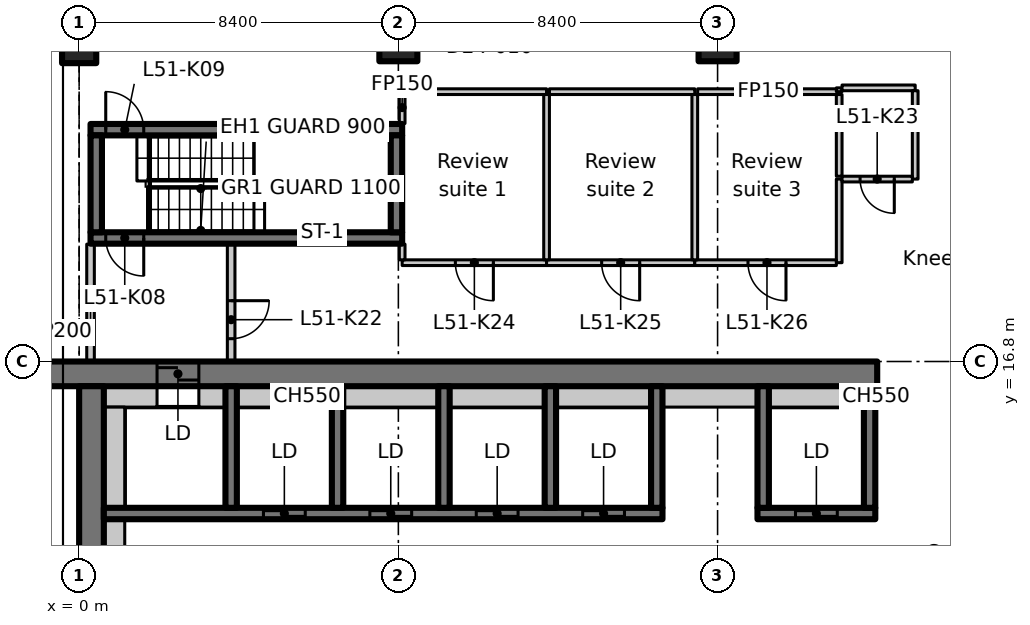
"""IFC4 building model, lengths in metres.
Left out: names, types, materials, properties, quantities, classifications, styles, units other than length and angle.
Written with IfcOpenShell. Run it as: python <this file> out.ifc"""

import sys

from ifc_helpers import new_model, si_unit, direction, frame, frame_2d, origin, origin_2d, place, context, subcontext, project, spatial, rectangle, extrude, element, fill, save


model = new_model("IFC4")
c1 = context("Model", 3, precision=1e-05, world=origin(), true_north=direction((0.0, 1.0)))
c2 = subcontext(c1, "Body", "Model", "MODEL_VIEW")
j1 = project(units=[si_unit("LENGTHUNIT", "METRE"), si_unit("PLANEANGLEUNIT", "RADIAN")], contexts=[c1])
p1 = place(None, origin())
s1 = spatial("IfcSite", under=j1, at=p1, CompositionType="ELEMENT")
p2 = place(p1, origin())
s2 = spatial("IfcBuilding", under=s1, at=p2, CompositionType="ELEMENT")
p3 = place(p2, frame((0.0, 0.0, 202.8)))
s3 = spatial("IfcBuildingStorey", under=s2, at=p3, CompositionType="ELEMENT", Elevation=202.8)
p4 = place(p3, frame((0.0, 25.2, 0.0), z_axis=(0.0, 0.0, 1.0), x_axis=(1.0, 0.0, 0.0)))
e1 = element("IfcColumn", 1, at=p4, inside=s3, PredefinedType="COLUMN", context=c2, shape_type="SweptSolid", body=[
    extrude(rectangle(XDim=0.9, YDim=1.1, at=origin_2d()), origin(), (0.0, 0.0, 1.0), 3.3),
])
for number, where, z_axis, x_axis in (
    (2, (8.4, 25.2, 0.0), (0.0, 0.0, 1.0), (1.0, 0.0, 0.0)),
    (3, (16.8, 25.2, 0.0), (0.0, 0.0, 1.0), (1.0, 0.0, 0.0)),
):
    element("IfcColumn", number, at=place(p3, frame(where, z_axis=z_axis, x_axis=x_axis)), inside=s3, PredefinedType="COLUMN", context=c2, shape_type="SweptSolid", body=[
        extrude(rectangle(XDim=1.0, YDim=1.0, at=origin_2d()), origin(), (0.0, 0.0, 1.0), 3.3),
    ])
p5 = place(p3, frame((-1.1, 16.475, 0.0), z_axis=(0.0, 0.0, 1.0), x_axis=(1.0, 0.0, 0.0)))
e4 = element("IfcWall", 4, at=p5, inside=s3, PredefinedType="SHEAR", context=c2, shape_type="SweptSolid", body=[
    extrude(rectangle(XDim=22.1, YDim=0.65, at=frame_2d((11.05, 0.0))), origin(), (0.0, 0.0, 1.0), 3.3),
])
p6 = place(p5, frame((3.15, 0.0, 0.0)))
e5 = element("IfcOpeningElement", 5, at=p6, cuts=e4, PredefinedType="OPENING", context=c2, shape_type="SweptSolid", body=[
    extrude(rectangle(XDim=1.1, YDim=2.3, at=frame_2d((0.55, 1.15))), frame((0.0, 0.335, 0.0), z_axis=(0.0, -1.0, 0.0), x_axis=(1.0, 0.0, 0.0)), (0.0, 0.0, 1.0), 0.67),
])
p7 = place(p3, frame((0.325, 7.286, 0.0), z_axis=(0.0, 0.0, 1.0), x_axis=(0.0, 1.0, 0.0)))
e6 = element("IfcWall", 6, at=p7, inside=s3, PredefinedType="SHEAR", context=c2, shape_type="SweptSolid", body=[
    extrude(rectangle(XDim=8.864, YDim=0.65, at=frame_2d((4.432, 0.0))), origin(), (0.0, 0.0, 1.0), 3.3),
])
p8 = place(p3, frame((0.65, 15.875, 0.0), z_axis=(0.0, 0.0, 1.0), x_axis=(1.0, 0.0, 0.0)))
e7 = element("IfcWall", 7, at=p8, inside=s3, PredefinedType="PARTITIONING", context=c2, shape_type="SweptSolid", body=[
    extrude(rectangle(XDim=1.4, YDim=0.55, at=frame_2d((0.7, 0.0))), origin(), (0.0, 0.0, 1.0), 3.3),
])
p9 = place(p3, frame((0.65, 12.8, 0.0), z_axis=(0.0, 0.0, 1.0), x_axis=(1.0, 0.0, 0.0)))
e8 = element("IfcWall", 8, at=p9, inside=s3, PredefinedType="SHEAR", context=c2, shape_type="SweptSolid", body=[
    extrude(rectangle(XDim=14.7, YDim=0.3, at=frame_2d((7.35, 0.0))), origin(), (0.0, 0.0, 1.0), 3.3),
])
p10 = place(p9, frame((4.2, 0.0, 0.0)))
e9 = element("IfcOpeningElement", 9, at=p10, cuts=e8, PredefinedType="OPENING", context=c2, shape_type="SweptSolid", body=[
    extrude(rectangle(XDim=1.1, YDim=2.3, at=frame_2d((0.55, 1.15))), frame((0.0, 0.16, 0.0), z_axis=(0.0, -1.0, 0.0), x_axis=(1.0, 0.0, 0.0)), (0.0, 0.0, 1.0), 0.32),
])
p11 = place(p9, frame((7.0, 0.0, 0.0)))
e10 = element("IfcOpeningElement", 10, at=p11, cuts=e8, PredefinedType="OPENING", context=c2, shape_type="SweptSolid", body=[
    extrude(rectangle(XDim=1.1, YDim=2.3, at=frame_2d((0.55, 1.15))), frame((0.0, 0.16, 0.0), z_axis=(0.0, -1.0, 0.0), x_axis=(1.0, 0.0, 0.0)), (0.0, 0.0, 1.0), 0.32),
])
p12 = place(p9, frame((9.8, 0.0, 0.0)))
e11 = element("IfcOpeningElement", 11, at=p12, cuts=e8, PredefinedType="OPENING", context=c2, shape_type="SweptSolid", body=[
    extrude(rectangle(XDim=1.1, YDim=2.3, at=frame_2d((0.55, 1.15))), frame((0.0, 0.16, 0.0), z_axis=(0.0, -1.0, 0.0), x_axis=(1.0, 0.0, 0.0)), (0.0, 0.0, 1.0), 0.32),
])
p13 = place(p9, frame((12.6, 0.0, 0.0)))
e12 = element("IfcOpeningElement", 12, at=p13, cuts=e8, PredefinedType="OPENING", context=c2, shape_type="SweptSolid", body=[
    extrude(rectangle(XDim=1.1, YDim=2.3, at=frame_2d((0.55, 1.15))), frame((0.0, 0.16, 0.0), z_axis=(0.0, -1.0, 0.0), x_axis=(1.0, 0.0, 0.0)), (0.0, 0.0, 1.0), 0.32),
])
for number, where, z_axis, x_axis in (
    (13, (4.0, 12.95, 0.0), (0.0, 0.0, 1.0), (0.0, 1.0, 0.0)),
    (14, (6.8, 12.95, 0.0), (0.0, 0.0, 1.0), (0.0, 1.0, 0.0)),
    (15, (9.6, 12.95, 0.0), (0.0, 0.0, 1.0), (0.0, 1.0, 0.0)),
    (16, (12.4, 12.95, 0.0), (0.0, 0.0, 1.0), (0.0, 1.0, 0.0)),
    (17, (15.2, 12.95, 0.0), (0.0, 0.0, 1.0), (0.0, 1.0, 0.0)),
):
    element("IfcWall", number, at=place(p3, frame(where, z_axis=z_axis, x_axis=x_axis)), inside=s3, PredefinedType="SHEAR", context=c2, shape_type="SweptSolid", body=[
        extrude(rectangle(XDim=3.2, YDim=0.3, at=frame_2d((1.6, 0.0))), origin(), (0.0, 0.0, 1.0), 3.3),
    ])
p14 = place(p3, frame((17.85, 12.8, 0.0), z_axis=(0.0, 0.0, 1.0), x_axis=(1.0, 0.0, 0.0)))
e18 = element("IfcWall", 18, at=p14, inside=s3, PredefinedType="SHEAR", context=c2, shape_type="SweptSolid", body=[
    extrude(rectangle(XDim=3.1, YDim=0.3, at=frame_2d((1.55, 0.0))), origin(), (0.0, 0.0, 1.0), 3.3),
])
p15 = place(p14, frame((1.0, 0.0, 0.0)))
e19 = element("IfcOpeningElement", 19, at=p15, cuts=e18, PredefinedType="OPENING", context=c2, shape_type="SweptSolid", body=[
    extrude(rectangle(XDim=1.1, YDim=2.3, at=frame_2d((0.55, 1.15))), frame((0.0, 0.16, 0.0), z_axis=(0.0, -1.0, 0.0), x_axis=(1.0, 0.0, 0.0)), (0.0, 0.0, 1.0), 0.32),
])
for number, where, z_axis, x_axis in (
    (20, (18.0, 12.95, 0.0), (0.0, 0.0, 1.0), (0.0, 1.0, 0.0)),
    (21, (20.8, 12.95, 0.0), (0.0, 0.0, 1.0), (0.0, 1.0, 0.0)),
):
    element("IfcWall", number, at=place(p3, frame(where, z_axis=z_axis, x_axis=x_axis)), inside=s3, PredefinedType="SHEAR", context=c2, shape_type="SweptSolid", body=[
        extrude(rectangle(XDim=3.2, YDim=0.3, at=frame_2d((1.6, 0.0))), origin(), (0.0, 0.0, 1.0), 3.3),
    ])
p16 = place(p3, frame((8.5, 20.05, 0.0), z_axis=(0.0, 0.0, 1.0), x_axis=(-1.0, 0.0, 0.0)))
e22 = element("IfcWall", 22, at=p16, inside=s3, PredefinedType="SHEAR", context=c2, shape_type="SweptSolid", body=[
    extrude(rectangle(XDim=8.2, YDim=0.3, at=frame_2d((4.1, 0.0))), origin(), (0.0, 0.0, 1.0), 3.3),
])
p17 = place(p16, frame((6.8, 0.0, 0.0)))
e23 = element("IfcOpeningElement", 23, at=p17, cuts=e22, PredefinedType="OPENING", context=c2, shape_type="SweptSolid", body=[
    extrude(rectangle(XDim=1.0, YDim=2.1, at=frame_2d((0.5, 1.05))), frame((0.0, 0.16, 0.0), z_axis=(0.0, -1.0, 0.0), x_axis=(1.0, 0.0, 0.0)), (0.0, 0.0, 1.0), 0.32),
])
p18 = place(p3, frame((0.3, 22.9, 0.0), z_axis=(0.0, 0.0, 1.0), x_axis=(1.0, 0.0, 0.0)))
e24 = element("IfcWall", 24, at=p18, inside=s3, PredefinedType="SHEAR", context=c2, shape_type="SweptSolid", body=[
    extrude(rectangle(XDim=8.2, YDim=0.3, at=frame_2d((4.1, 0.0))), origin(), (0.0, 0.0, 1.0), 3.3),
])
p19 = place(p18, frame((0.4, 0.0, 0.0)))
e25 = element("IfcOpeningElement", 25, at=p19, cuts=e24, PredefinedType="OPENING", context=c2, shape_type="SweptSolid", body=[
    extrude(rectangle(XDim=1.0, YDim=2.1, at=frame_2d((0.5, 1.05))), frame((0.0, 0.16, 0.0), z_axis=(0.0, -1.0, 0.0), x_axis=(1.0, 0.0, 0.0)), (0.0, 0.0, 1.0), 0.32),
])
for number, where, z_axis, x_axis in (
    (26, (0.45, 20.2, 0.0), (0.0, 0.0, 1.0), (0.0, 1.0, 0.0)),
    (27, (8.35, 20.2, 0.0), (0.0, 0.0, 1.0), (0.0, 1.0, 0.0)),
):
    element("IfcWall", number, at=place(p3, frame(where, z_axis=z_axis, x_axis=x_axis)), inside=s3, PredefinedType="SHEAR", context=c2, shape_type="SweptSolid", body=[
        extrude(rectangle(XDim=2.55, YDim=0.3, at=frame_2d((1.275, 0.0))), origin(), (0.0, 0.0, 1.0), 3.3),
    ])
p20 = place(p3, frame((0.3, 16.812, 0.0), z_axis=(0.0, 0.0, 1.0), x_axis=(0.0, 1.0, 0.0)))
e28 = element("IfcWall", 28, at=p20, inside=s3, PredefinedType="PARTITIONING", context=c2, shape_type="SweptSolid", body=[
    extrude(rectangle(XDim=3.076, YDim=0.2, at=frame_2d((1.538, 0.0))), origin(), (0.0, 0.0, 1.0), 2.93),
])
p21 = place(p3, frame((4.0, 19.888, 0.0), z_axis=(0.0, 0.0, 1.0), x_axis=(0.0, -1.0, 0.0)))
e29 = element("IfcWall", 29, at=p21, inside=s3, PredefinedType="PARTITIONING", context=c2, shape_type="SweptSolid", body=[
    extrude(rectangle(XDim=3.076, YDim=0.2, at=frame_2d((1.538, 0.0))), origin(), (0.0, 0.0, 1.0), 3.3),
])
p22 = place(p21, frame((1.488, 0.0, 0.0)))
e30 = element("IfcOpeningElement", 30, at=p22, cuts=e29, PredefinedType="OPENING", context=c2, shape_type="SweptSolid", body=[
    extrude(rectangle(XDim=1.0, YDim=2.1, at=frame_2d((0.5, 1.05))), frame((0.0, 0.11, 0.0), z_axis=(0.0, -1.0, 0.0), x_axis=(1.0, 0.0, 0.0)), (0.0, 0.0, 1.0), 0.22),
])
p23 = place(p3, frame((12.3, 19.4, 0.0), z_axis=(0.0, 0.0, 1.0), x_axis=(-1.0, 0.0, 0.0)))
e31 = element("IfcWall", 31, at=p23, inside=s3, PredefinedType="PARTITIONING", context=c2, shape_type="SweptSolid", body=[
    extrude(rectangle(XDim=3.8, YDim=0.15, at=frame_2d((1.9, 0.0))), origin(), (0.0, 0.0, 1.0), 3.3),
])
p24 = place(p23, frame((1.4, 0.0, 0.0)))
e32 = element("IfcOpeningElement", 32, at=p24, cuts=e31, PredefinedType="OPENING", context=c2, shape_type="SweptSolid", body=[
    extrude(rectangle(XDim=1.0, YDim=2.1, at=frame_2d((0.5, 1.05))), frame((0.0, 0.085, 0.0), z_axis=(0.0, -1.0, 0.0), x_axis=(1.0, 0.0, 0.0)), (0.0, 0.0, 1.0), 0.17),
])
p25 = place(p3, frame((8.5, 19.475, 0.0), z_axis=(0.0, 0.0, 1.0), x_axis=(0.0, 1.0, 0.0)))
e33 = element("IfcWall", 33, at=p25, inside=s3, PredefinedType="PARTITIONING", context=c2, shape_type="SweptSolid", body=[
    extrude(rectangle(XDim=0.413, YDim=0.15, at=frame_2d((0.207, 0.0))), origin(), (0.0, 0.0, 1.0), 3.3),
])
p26 = place(p3, frame((8.5, 23.062, 0.0), z_axis=(0.0, 0.0, 1.0), x_axis=(0.0, 1.0, 0.0)))
e34 = element("IfcWall", 34, at=p26, inside=s3, PredefinedType="PARTITIONING", context=c2, shape_type="SweptSolid", body=[
    extrude(rectangle(XDim=0.838, YDim=0.15, at=frame_2d((0.419, 0.0))), origin(), (0.0, 0.0, 1.0), 3.3),
])
p27 = place(p3, frame((8.575, 23.9, 0.0), z_axis=(0.0, 0.0, 1.0), x_axis=(1.0, 0.0, 0.0)))
e35 = element("IfcWall", 35, at=p27, inside=s3, PredefinedType="PARTITIONING", context=c2, shape_type="SweptSolid", body=[
    extrude(rectangle(XDim=3.725, YDim=0.15, at=frame_2d((1.863, 0.0))), origin(), (0.0, 0.0, 1.0), 3.3),
])
p28 = place(p3, frame((16.2, 19.4, 0.0), z_axis=(0.0, 0.0, 1.0), x_axis=(-1.0, 0.0, 0.0)))
e36 = element("IfcWall", 36, at=p28, inside=s3, PredefinedType="PARTITIONING", context=c2, shape_type="SweptSolid", body=[
    extrude(rectangle(XDim=3.9, YDim=0.15, at=frame_2d((1.95, 0.0))), origin(), (0.0, 0.0, 1.0), 3.3),
])
p29 = place(p28, frame((1.45, 0.0, 0.0)))
e37 = element("IfcOpeningElement", 37, at=p29, cuts=e36, PredefinedType="OPENING", context=c2, shape_type="SweptSolid", body=[
    extrude(rectangle(XDim=1.0, YDim=2.1, at=frame_2d((0.5, 1.05))), frame((0.0, 0.085, 0.0), z_axis=(0.0, -1.0, 0.0), x_axis=(1.0, 0.0, 0.0)), (0.0, 0.0, 1.0), 0.17),
])
p30 = place(p3, frame((12.3, 23.825, 0.0), z_axis=(0.0, 0.0, 1.0), x_axis=(0.0, -1.0, 0.0)))
e38 = element("IfcWall", 38, at=p30, inside=s3, PredefinedType="PARTITIONING", context=c2, shape_type="SweptSolid", body=[
    extrude(rectangle(XDim=4.35, YDim=0.15, at=frame_2d((2.175, 0.0))), origin(), (0.0, 0.0, 1.0), 3.3),
])
p31 = place(p3, frame((12.375, 23.9, 0.0), z_axis=(0.0, 0.0, 1.0), x_axis=(1.0, 0.0, 0.0)))
e39 = element("IfcWall", 39, at=p31, inside=s3, PredefinedType="PARTITIONING", context=c2, shape_type="SweptSolid", body=[
    extrude(rectangle(XDim=3.825, YDim=0.15, at=frame_2d((1.913, 0.0))), origin(), (0.0, 0.0, 1.0), 3.3),
])
p32 = place(p3, frame((20.0, 21.6, 0.0), z_axis=(0.0, 0.0, 1.0), x_axis=(0.0, -1.0, 0.0)))
e40 = element("IfcWall", 40, at=p32, inside=s3, PredefinedType="PARTITIONING", context=c2, shape_type="SweptSolid", body=[
    extrude(rectangle(XDim=2.2, YDim=0.15, at=frame_2d((1.1, 0.0))), origin(), (0.0, 0.0, 1.0), 3.3),
])
p33 = place(p3, frame((19.925, 19.4, 0.0), z_axis=(0.0, 0.0, 1.0), x_axis=(-1.0, 0.0, 0.0)))
e41 = element("IfcWall", 41, at=p33, inside=s3, PredefinedType="PARTITIONING", context=c2, shape_type="SweptSolid", body=[
    extrude(rectangle(XDim=3.725, YDim=0.15, at=frame_2d((1.863, 0.0))), origin(), (0.0, 0.0, 1.0), 3.3),
])
p34 = place(p33, frame((1.325, 0.0, 0.0)))
e42 = element("IfcOpeningElement", 42, at=p34, cuts=e41, PredefinedType="OPENING", context=c2, shape_type="SweptSolid", body=[
    extrude(rectangle(XDim=1.0, YDim=2.1, at=frame_2d((0.5, 1.05))), frame((0.0, 0.085, 0.0), z_axis=(0.0, -1.0, 0.0), x_axis=(1.0, 0.0, 0.0)), (0.0, 0.0, 1.0), 0.17),
])
p35 = place(p3, frame((16.2, 23.825, 0.0), z_axis=(0.0, 0.0, 1.0), x_axis=(0.0, -1.0, 0.0)))
e43 = element("IfcWall", 43, at=p35, inside=s3, PredefinedType="PARTITIONING", context=c2, shape_type="SweptSolid", body=[
    extrude(rectangle(XDim=4.35, YDim=0.15, at=frame_2d((2.175, 0.0))), origin(), (0.0, 0.0, 1.0), 3.3),
])
p36 = place(p3, frame((16.275, 23.9, 0.0), z_axis=(0.0, 0.0, 1.0), x_axis=(1.0, 0.0, 0.0)))
e44 = element("IfcWall", 44, at=p36, inside=s3, PredefinedType="PARTITIONING", context=c2, shape_type="SweptSolid", body=[
    extrude(rectangle(XDim=3.725, YDim=0.15, at=frame_2d((1.863, 0.0))), origin(), (0.0, 0.0, 1.0), 3.3),
])
p37 = place(p3, frame((20.0, 23.9, 0.0), z_axis=(0.0, 0.0, 1.0), x_axis=(0.0, 1.0, 0.0)))
e45 = element("IfcWall", 45, at=p37, inside=s3, PredefinedType="PARTITIONING", context=c2, shape_type="SweptSolid", body=[
    extrude(rectangle(XDim=0.1, YDim=0.15, at=frame_2d((0.05, 0.0))), origin(), (0.0, 0.0, 1.0), 3.3),
])
p38 = place(p3, frame((20.075, 24.0, 0.0), z_axis=(0.0, 0.0, 1.0), x_axis=(1.0, 0.0, 0.0)))
e46 = element("IfcWall", 46, at=p38, inside=s3, PredefinedType="PARTITIONING", context=c2, shape_type="SweptSolid", body=[
    extrude(rectangle(XDim=1.925, YDim=0.15, at=frame_2d((0.962, 0.0))), origin(), (0.0, 0.0, 1.0), 3.3),
])
p39 = place(p3, frame((22.0, 23.925, 0.0), z_axis=(0.0, 0.0, 1.0), x_axis=(0.0, -1.0, 0.0)))
e47 = element("IfcWall", 47, at=p39, inside=s3, PredefinedType="PARTITIONING", context=c2, shape_type="SweptSolid", body=[
    extrude(rectangle(XDim=2.325, YDim=0.15, at=frame_2d((1.163, 0.0))), origin(), (0.0, 0.0, 1.0), 3.3),
])
p40 = place(p3, frame((21.925, 21.6, 0.0), z_axis=(0.0, 0.0, 1.0), x_axis=(-1.0, 0.0, 0.0)))
e48 = element("IfcWall", 48, at=p40, inside=s3, PredefinedType="PARTITIONING", context=c2, shape_type="SweptSolid", body=[
    extrude(rectangle(XDim=1.85, YDim=0.15, at=frame_2d((0.925, 0.0))), origin(), (0.0, 0.0, 1.0), 3.3),
])
p41 = place(p40, frame((0.475, 0.0, 0.0)))
e49 = element("IfcOpeningElement", 49, at=p41, cuts=e48, PredefinedType="OPENING", context=c2, shape_type="SweptSolid", body=[
    extrude(rectangle(XDim=0.9, YDim=2.1, at=frame_2d((0.45, 1.05))), frame((0.0, 0.085, 0.0), z_axis=(0.0, -1.0, 0.0), x_axis=(1.0, 0.0, 0.0)), (0.0, 0.0, 1.0), 0.17),
])
p42 = place(p3, frame((20.0, 21.675, 0.0), z_axis=(0.0, 0.0, 1.0), x_axis=(0.0, 1.0, 0.0)))
e50 = element("IfcWall", 50, at=p42, inside=s3, PredefinedType="PARTITIONING", context=c2, shape_type="SweptSolid", body=[
    extrude(rectangle(XDim=2.15, YDim=0.15, at=frame_2d((1.075, 0.0))), origin(), (0.0, 0.0, 1.0), 3.3),
])
p43 = place(p3, frame((0.925, 7.286, 0.0), z_axis=(0.0, 0.0, 1.0), x_axis=(0.0, 1.0, 0.0)))
e51 = element("IfcWall", 51, at=p43, inside=s3, PredefinedType="PARTITIONING", context=c2, shape_type="SweptSolid", body=[
    extrude(rectangle(XDim=5.364, YDim=0.55, at=frame_2d((2.682, 0.0))), origin(), (0.0, 0.0, 1.0), 3.3),
])
p44 = place(p3, frame((0.925, 12.95, 0.0), z_axis=(0.0, 0.0, 1.0), x_axis=(0.0, 1.0, 0.0)))
e52 = element("IfcWall", 52, at=p44, inside=s3, PredefinedType="PARTITIONING", context=c2, shape_type="SweptSolid", body=[
    extrude(rectangle(XDim=2.65, YDim=0.55, at=frame_2d((1.325, 0.0))), origin(), (0.0, 0.0, 1.0), 3.3),
])
p45 = place(p3, frame((3.15, 15.875, 0.0), z_axis=(0.0, 0.0, 1.0), x_axis=(1.0, 0.0, 0.0)))
e53 = element("IfcWall", 53, at=p45, inside=s3, PredefinedType="PARTITIONING", context=c2, shape_type="SweptSolid", body=[
    extrude(rectangle(XDim=0.7, YDim=0.55, at=frame_2d((0.35, 0.0))), origin(), (0.0, 0.0, 1.0), 3.3),
])
for number, where, z_axis, x_axis in (
    (54, (4.15, 15.875, 0.0), (0.0, 0.0, 1.0), (1.0, 0.0, 0.0)),
    (55, (6.95, 15.875, 0.0), (0.0, 0.0, 1.0), (1.0, 0.0, 0.0)),
    (56, (9.75, 15.875, 0.0), (0.0, 0.0, 1.0), (1.0, 0.0, 0.0)),
    (57, (12.55, 15.875, 0.0), (0.0, 0.0, 1.0), (1.0, 0.0, 0.0)),
    (58, (15.35, 15.875, 0.0), (0.0, 0.0, 1.0), (1.0, 0.0, 0.0)),
    (59, (18.15, 15.875, 0.0), (0.0, 0.0, 1.0), (1.0, 0.0, 0.0)),
):
    element("IfcWall", number, at=place(p3, frame(where, z_axis=z_axis, x_axis=x_axis)), inside=s3, PredefinedType="PARTITIONING", context=c2, shape_type="SweptSolid", body=[
        extrude(rectangle(XDim=2.5, YDim=0.55, at=frame_2d((1.25, 0.0))), origin(), (0.0, 0.0, 1.0), 3.3),
    ])
p46 = place(p3, frame((20.95, 15.875, 0.0), z_axis=(0.0, 0.0, 1.0), x_axis=(1.0, 0.0, 0.0)))
e60 = element("IfcWall", 60, at=p46, inside=s3, PredefinedType="PARTITIONING", context=c2, shape_type="SweptSolid", body=[
    extrude(rectangle(XDim=0.05, YDim=0.55, at=frame_2d((0.025, 0.0))), origin(), (0.0, 0.0, 1.0), 3.3),
])
p47 = place(p6, origin())
e61 = element("IfcDoor", 61, at=p47, inside=s3, OperationType="SLIDING_TO_LEFT", PredefinedType="DOOR", context=c2, shape_type="SweptSolid", body=[
    extrude(rectangle(XDim=1.1, YDim=2.3, at=frame_2d((0.55, 1.15))), frame((0.0, 0.025, 0.0), z_axis=(0.0, -1.0, 0.0), x_axis=(1.0, 0.0, 0.0)), (0.0, 0.0, 1.0), 0.05),
])
fill(e5, e61)
p48 = place(p10, origin())
e62 = element("IfcDoor", 62, at=p48, inside=s3, OperationType="SLIDING_TO_LEFT", PredefinedType="DOOR", context=c2, shape_type="SweptSolid", body=[
    extrude(rectangle(XDim=1.1, YDim=2.3, at=frame_2d((0.55, 1.15))), frame((0.0, 0.025, 0.0), z_axis=(0.0, -1.0, 0.0), x_axis=(1.0, 0.0, 0.0)), (0.0, 0.0, 1.0), 0.05),
])
fill(e9, e62)
p49 = place(p11, origin())
e63 = element("IfcDoor", 63, at=p49, inside=s3, OperationType="SLIDING_TO_LEFT", PredefinedType="DOOR", context=c2, shape_type="SweptSolid", body=[
    extrude(rectangle(XDim=1.1, YDim=2.3, at=frame_2d((0.55, 1.15))), frame((0.0, 0.025, 0.0), z_axis=(0.0, -1.0, 0.0), x_axis=(1.0, 0.0, 0.0)), (0.0, 0.0, 1.0), 0.05),
])
fill(e10, e63)
p50 = place(p12, origin())
e64 = element("IfcDoor", 64, at=p50, inside=s3, OperationType="SLIDING_TO_LEFT", PredefinedType="DOOR", context=c2, shape_type="SweptSolid", body=[
    extrude(rectangle(XDim=1.1, YDim=2.3, at=frame_2d((0.55, 1.15))), frame((0.0, 0.025, 0.0), z_axis=(0.0, -1.0, 0.0), x_axis=(1.0, 0.0, 0.0)), (0.0, 0.0, 1.0), 0.05),
])
fill(e11, e64)
p51 = place(p13, origin())
e65 = element("IfcDoor", 65, at=p51, inside=s3, OperationType="SLIDING_TO_LEFT", PredefinedType="DOOR", context=c2, shape_type="SweptSolid", body=[
    extrude(rectangle(XDim=1.1, YDim=2.3, at=frame_2d((0.55, 1.15))), frame((0.0, 0.025, 0.0), z_axis=(0.0, -1.0, 0.0), x_axis=(1.0, 0.0, 0.0)), (0.0, 0.0, 1.0), 0.05),
])
fill(e12, e65)
p52 = place(p15, origin())
e66 = element("IfcDoor", 66, at=p52, inside=s3, OperationType="SLIDING_TO_LEFT", PredefinedType="DOOR", context=c2, shape_type="SweptSolid", body=[
    extrude(rectangle(XDim=1.1, YDim=2.3, at=frame_2d((0.55, 1.15))), frame((0.0, 0.025, 0.0), z_axis=(0.0, -1.0, 0.0), x_axis=(1.0, 0.0, 0.0)), (0.0, 0.0, 1.0), 0.05),
])
fill(e19, e66)
p53 = place(p17, origin())
e67 = element("IfcDoor", 67, at=p53, inside=s3, OperationType="SINGLE_SWING_RIGHT", PredefinedType="DOOR", context=c2, shape_type="SweptSolid", body=[
    extrude(rectangle(XDim=1.0, YDim=2.1, at=frame_2d((0.5, 1.05))), frame((0.0, 0.025, 0.0), z_axis=(0.0, -1.0, 0.0), x_axis=(1.0, 0.0, 0.0)), (0.0, 0.0, 1.0), 0.05),
])
fill(e23, e67)
p54 = place(p19, origin())
e68 = element("IfcDoor", 68, at=p54, inside=s3, OperationType="SINGLE_SWING_LEFT", PredefinedType="DOOR", context=c2, shape_type="SweptSolid", body=[
    extrude(rectangle(XDim=1.0, YDim=2.1, at=frame_2d((0.5, 1.05))), frame((0.0, 0.025, 0.0), z_axis=(0.0, -1.0, 0.0), x_axis=(1.0, 0.0, 0.0)), (0.0, 0.0, 1.0), 0.05),
])
fill(e25, e68)
p55 = place(p22, origin())
e69 = element("IfcDoor", 69, at=p55, inside=s3, OperationType="SINGLE_SWING_RIGHT", PredefinedType="DOOR", context=c2, shape_type="SweptSolid", body=[
    extrude(rectangle(XDim=1.0, YDim=2.1, at=frame_2d((0.5, 1.05))), frame((0.0, 0.025, 0.0), z_axis=(0.0, -1.0, 0.0), x_axis=(1.0, 0.0, 0.0)), (0.0, 0.0, 1.0), 0.05),
])
fill(e30, e69)
p56 = place(p41, origin())
e70 = element("IfcDoor", 70, at=p56, inside=s3, OperationType="SINGLE_SWING_LEFT", PredefinedType="DOOR", context=c2, shape_type="SweptSolid", body=[
    extrude(rectangle(XDim=0.9, YDim=2.1, at=frame_2d((0.45, 1.05))), frame((0.0, 0.025, 0.0), z_axis=(0.0, -1.0, 0.0), x_axis=(1.0, 0.0, 0.0)), (0.0, 0.0, 1.0), 0.05),
])
fill(e49, e70)
p57 = place(p24, origin())
e71 = element("IfcDoor", 71, at=p57, inside=s3, OperationType="SINGLE_SWING_RIGHT", PredefinedType="DOOR", context=c2, shape_type="SweptSolid", body=[
    extrude(rectangle(XDim=1.0, YDim=2.1, at=frame_2d((0.5, 1.05))), frame((0.0, 0.025, 0.0), z_axis=(0.0, -1.0, 0.0), x_axis=(1.0, 0.0, 0.0)), (0.0, 0.0, 1.0), 0.05),
])
fill(e32, e71)
p58 = place(p29, origin())
e72 = element("IfcDoor", 72, at=p58, inside=s3, OperationType="SINGLE_SWING_LEFT", PredefinedType="DOOR", context=c2, shape_type="SweptSolid", body=[
    extrude(rectangle(XDim=1.0, YDim=2.1, at=frame_2d((0.5, 1.05))), frame((0.0, 0.025, 0.0), z_axis=(0.0, -1.0, 0.0), x_axis=(1.0, 0.0, 0.0)), (0.0, 0.0, 1.0), 0.05),
])
fill(e37, e72)
p59 = place(p34, origin())
e73 = element("IfcDoor", 73, at=p59, inside=s3, OperationType="SINGLE_SWING_RIGHT", PredefinedType="DOOR", context=c2, shape_type="SweptSolid", body=[
    extrude(rectangle(XDim=1.0, YDim=2.1, at=frame_2d((0.5, 1.05))), frame((0.0, 0.025, 0.0), z_axis=(0.0, -1.0, 0.0), x_axis=(1.0, 0.0, 0.0)), (0.0, 0.0, 1.0), 0.05),
])
fill(e42, e73)
save(model, sys.argv[1])
